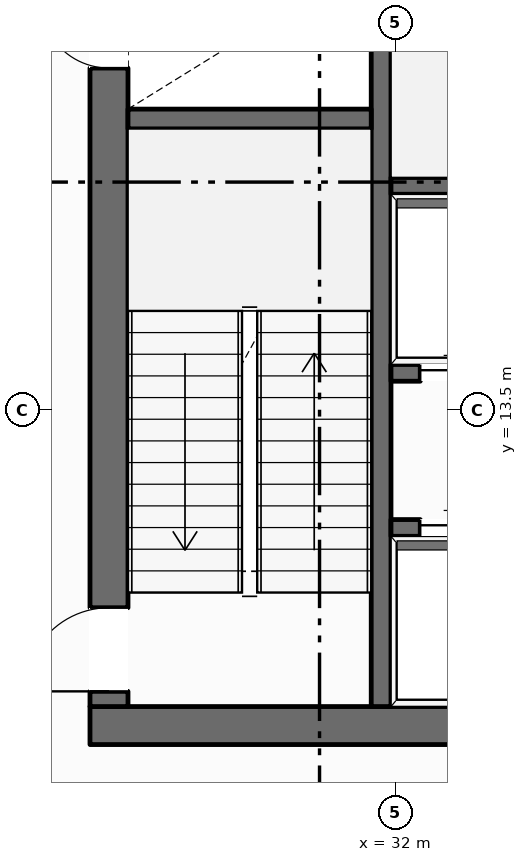
"""IFC4 building model, lengths in metres.
Left out: names, types, materials, properties, quantities, classifications, styles, units other than length and angle.
Written with IfcOpenShell. Run it as: python <this file> out.ifc"""

import sys

from ifc_helpers import new_model, si_unit, direction, frame, frame_2d, origin, place, context, subcontext, project, spatial, rectangle, extrude, element, fill, save


model = new_model("IFC4")
c1 = context("Model", 3, precision=1e-05, world=origin(), true_north=direction((0.0, 1.0)))
c2 = subcontext(c1, "Body", "Model", "MODEL_VIEW")
j1 = project(units=[si_unit("LENGTHUNIT", "METRE"), si_unit("PLANEANGLEUNIT", "RADIAN")], contexts=[c1])
p1 = place(None, origin())
s1 = spatial("IfcSite", under=j1, at=p1, CompositionType="ELEMENT")
p2 = place(p1, origin())
s2 = spatial("IfcBuilding", under=s1, at=p2, CompositionType="ELEMENT")
p3 = place(p2, frame((0.0, 0.0, 80.5)))
s3 = spatial("IfcBuildingStorey", under=s2, at=p3, CompositionType="ELEMENT", Elevation=80.5)
p4 = place(p3, frame((27.98, 9.35, 0.0), z_axis=(0.0, 0.0, 1.0), x_axis=(1.0, 0.0, 0.0)))
e1 = element("IfcWall", 1, at=p4, inside=s3, PredefinedType="SOLIDWALL", context=c2, shape_type="SweptSolid", body=[
    extrude(rectangle(XDim=20.04, YDim=0.5, at=frame_2d((10.02, 0.0))), origin(), (0.0, 0.0, 1.0), 4.75),
])
p5 = place(p4, frame((10.52, 0.0, 0.0)))
e2 = element("IfcOpeningElement", 2, at=p5, cuts=e1, PredefinedType="OPENING", context=c2, shape_type="SweptSolid", body=[
    extrude(rectangle(XDim=1.4, YDim=2.2, at=frame_2d((0.7, 1.1))), frame((0.0, 0.26, 0.0), z_axis=(0.0, -1.0, 0.0), x_axis=(1.0, 0.0, 0.0)), (0.0, 0.0, 1.0), 0.52),
])
p6 = place(p3, frame((28.23, 9.6, 0.0), z_axis=(0.0, 0.0, 1.0), x_axis=(0.0, 1.0, 0.0)))
e3 = element("IfcWall", 3, at=p6, inside=s3, PredefinedType="SOLIDWALL", context=c2, shape_type="SweptSolid", body=[
    extrude(rectangle(XDim=13.0, YDim=0.5, at=frame_2d((6.5, 0.0))), origin(), (0.0, 0.0, 1.0), 4.75),
])
p7 = place(p6, frame((0.2, 0.0, 0.0)))
e4 = element("IfcOpeningElement", 4, at=p7, cuts=e3, PredefinedType="OPENING", context=c2, shape_type="SweptSolid", body=[
    extrude(rectangle(XDim=1.1, YDim=2.15, at=frame_2d((0.55, 1.075))), frame((0.0, 0.26, 0.0), z_axis=(0.0, -1.0, 0.0), x_axis=(1.0, 0.0, 0.0)), (0.0, 0.0, 1.0), 0.52),
])
p8 = place(p6, frame((8.4, 0.0, 0.0)))
e5 = element("IfcOpeningElement", 5, at=p8, cuts=e3, PredefinedType="OPENING", context=c2, shape_type="SweptSolid", body=[
    extrude(rectangle(XDim=0.9, YDim=2.1, at=frame_2d((0.45, 1.05))), frame((0.0, 0.26, 0.0), z_axis=(0.0, -1.0, 0.0), x_axis=(1.0, 0.0, 0.0)), (0.0, 0.0, 1.0), 0.52),
])
p9 = place(p3, frame((31.81, 9.6, 0.0), z_axis=(0.0, 0.0, 1.0), x_axis=(0.0, 1.0, 0.0)))
e6 = element("IfcWall", 6, at=p9, inside=s3, PredefinedType="SHEAR", context=c2, shape_type="SweptSolid", body=[
    extrude(rectangle(XDim=13.0, YDim=0.26, at=frame_2d((6.5, 0.0))), origin(), (0.0, 0.0, 1.0), 4.75),
])
p10 = place(p9, frame((10.925, 0.0, 0.0)))
e7 = element("IfcOpeningElement", 7, at=p10, cuts=e6, PredefinedType="OPENING", context=c2, shape_type="SweptSolid", body=[
    extrude(rectangle(XDim=1.25, YDim=2.25, at=frame_2d((0.625, 1.125))), frame((0.0, 0.14, 0.0), z_axis=(0.0, -1.0, 0.0), x_axis=(1.0, 0.0, 0.0)), (0.0, 0.0, 1.0), 0.28),
])
p11 = place(p3, frame((28.48, 17.33, 0.0), z_axis=(0.0, 0.0, 1.0), x_axis=(1.0, 0.0, 0.0)))
e8 = element("IfcWall", 8, at=p11, inside=s3, PredefinedType="SHEAR", context=c2, shape_type="SweptSolid", body=[
    extrude(rectangle(XDim=3.2, YDim=0.26, at=frame_2d((1.6, 0.0))), origin(), (0.0, 0.0, 1.0), 4.75),
])
p12 = place(p3, frame((31.94, 16.45, 0.0), z_axis=(0.0, 0.0, 1.0), x_axis=(1.0, 0.0, 0.0)))
e9 = element("IfcWall", 9, at=p12, inside=s3, PredefinedType="SOLIDWALL", context=c2, shape_type="SweptSolid", body=[
    extrude(rectangle(XDim=12.12, YDim=0.22, at=frame_2d((6.06, 0.0))), origin(), (0.0, 0.0, 1.0), 4.75),
])
p13 = place(p3, frame((31.94, 13.99, 0.0), z_axis=(0.0, 0.0, 1.0), x_axis=(1.0, 0.0, 0.0)))
e10 = element("IfcWall", 10, at=p13, inside=s3, PredefinedType="SOLIDWALL", context=c2, shape_type="SweptSolid", body=[
    extrude(rectangle(XDim=12.12, YDim=0.22, at=frame_2d((6.06, 0.0))), origin(), (0.0, 0.0, 1.0), 4.75),
])
p14 = place(p13, frame((0.385, 0.0, 0.0)))
e11 = element("IfcOpeningElement", 11, at=p14, cuts=e10, PredefinedType="OPENING", context=c2, shape_type="SweptSolid", body=[
    extrude(rectangle(XDim=1.1, YDim=2.2, at=frame_2d((0.55, 1.1))), frame((0.0, 0.12, 0.0), z_axis=(0.0, -1.0, 0.0), x_axis=(1.0, 0.0, 0.0)), (0.0, 0.0, 1.0), 0.24),
])
p15 = place(p13, frame((2.435, 0.0, 0.0)))
e12 = element("IfcOpeningElement", 12, at=p15, cuts=e10, PredefinedType="OPENING", context=c2, shape_type="SweptSolid", body=[
    extrude(rectangle(XDim=1.1, YDim=2.2, at=frame_2d((0.55, 1.1))), frame((0.0, 0.12, 0.0), z_axis=(0.0, -1.0, 0.0), x_axis=(1.0, 0.0, 0.0)), (0.0, 0.0, 1.0), 0.24),
])
p16 = place(p13, frame((4.485, 0.0, 0.0)))
e13 = element("IfcOpeningElement", 13, at=p16, cuts=e10, PredefinedType="OPENING", context=c2, shape_type="SweptSolid", body=[
    extrude(rectangle(XDim=1.1, YDim=2.2, at=frame_2d((0.55, 1.1))), frame((0.0, 0.12, 0.0), z_axis=(0.0, -1.0, 0.0), x_axis=(1.0, 0.0, 0.0)), (0.0, 0.0, 1.0), 0.24),
])
p17 = place(p13, frame((6.535, 0.0, 0.0)))
e14 = element("IfcOpeningElement", 14, at=p17, cuts=e10, PredefinedType="OPENING", context=c2, shape_type="SweptSolid", body=[
    extrude(rectangle(XDim=1.1, YDim=2.2, at=frame_2d((0.55, 1.1))), frame((0.0, 0.12, 0.0), z_axis=(0.0, -1.0, 0.0), x_axis=(1.0, 0.0, 0.0)), (0.0, 0.0, 1.0), 0.24),
])
p18 = place(p13, frame((8.585, 0.0, 0.0)))
e15 = element("IfcOpeningElement", 15, at=p18, cuts=e10, PredefinedType="OPENING", context=c2, shape_type="SweptSolid", body=[
    extrude(rectangle(XDim=1.1, YDim=2.2, at=frame_2d((0.55, 1.1))), frame((0.0, 0.12, 0.0), z_axis=(0.0, -1.0, 0.0), x_axis=(1.0, 0.0, 0.0)), (0.0, 0.0, 1.0), 0.24),
])
p19 = place(p13, frame((10.635, 0.0, 0.0)))
e16 = element("IfcOpeningElement", 16, at=p19, cuts=e10, PredefinedType="OPENING", context=c2, shape_type="SweptSolid", body=[
    extrude(rectangle(XDim=1.1, YDim=2.2, at=frame_2d((0.55, 1.1))), frame((0.0, 0.12, 0.0), z_axis=(0.0, -1.0, 0.0), x_axis=(1.0, 0.0, 0.0)), (0.0, 0.0, 1.0), 0.24),
])
p20 = place(p3, frame((31.94, 11.95, 0.0), z_axis=(0.0, 0.0, 1.0), x_axis=(1.0, 0.0, 0.0)))
e17 = element("IfcWall", 17, at=p20, inside=s3, PredefinedType="SOLIDWALL", context=c2, shape_type="SweptSolid", body=[
    extrude(rectangle(XDim=6.19, YDim=0.22, at=frame_2d((3.095, 0.0))), origin(), (0.0, 0.0, 1.0), 4.75),
])
p21 = place(p20, frame((0.385, 0.0, 0.0)))
e18 = element("IfcOpeningElement", 18, at=p21, cuts=e17, PredefinedType="OPENING", context=c2, shape_type="SweptSolid", body=[
    extrude(rectangle(XDim=1.1, YDim=2.2, at=frame_2d((0.55, 1.1))), frame((0.0, 0.12, 0.0), z_axis=(0.0, -1.0, 0.0), x_axis=(1.0, 0.0, 0.0)), (0.0, 0.0, 1.0), 0.24),
])
p22 = place(p20, frame((2.435, 0.0, 0.0)))
e19 = element("IfcOpeningElement", 19, at=p22, cuts=e17, PredefinedType="OPENING", context=c2, shape_type="SweptSolid", body=[
    extrude(rectangle(XDim=1.1, YDim=2.2, at=frame_2d((0.55, 1.1))), frame((0.0, 0.12, 0.0), z_axis=(0.0, -1.0, 0.0), x_axis=(1.0, 0.0, 0.0)), (0.0, 0.0, 1.0), 0.24),
])
p23 = place(p20, frame((4.485, 0.0, 0.0)))
e20 = element("IfcOpeningElement", 20, at=p23, cuts=e17, PredefinedType="OPENING", context=c2, shape_type="SweptSolid", body=[
    extrude(rectangle(XDim=1.1, YDim=2.2, at=frame_2d((0.55, 1.1))), frame((0.0, 0.12, 0.0), z_axis=(0.0, -1.0, 0.0), x_axis=(1.0, 0.0, 0.0)), (0.0, 0.0, 1.0), 0.24),
])
p24 = place(p3, frame((13.724, 13.51, 0.0), z_axis=(0.0, 0.0, 1.0), x_axis=(0.500779221595, 0.865575052331, 0.0)))
e21 = element("IfcWall", 21, at=p24, inside=s3, PredefinedType="STANDARD", context=c2, shape_type="SweptSolid", body=[
    extrude(rectangle(XDim=35.421, YDim=0.38, at=frame_2d((17.71, 0.0))), origin(), (0.0, 0.0, 1.0), 4.209),
])
p25 = place(p24, frame((31.073, 0.0, 0.65)))
e22 = element("IfcOpeningElement", 22, at=p25, cuts=e21, PredefinedType="OPENING", context=c2, shape_type="SweptSolid", body=[
    extrude(rectangle(XDim=2.0, YDim=2.25, at=frame_2d((1.0, 1.125))), frame((0.0, 0.2, 0.0), z_axis=(0.0, -1.0, 0.0), x_axis=(1.0, 0.0, 0.0)), (0.0, 0.0, 1.0), 0.4),
])
p26 = place(p24, frame((2.348, 0.0, 0.65)))
e23 = element("IfcOpeningElement", 23, at=p26, cuts=e21, PredefinedType="OPENING", context=c2, shape_type="SweptSolid", body=[
    extrude(rectangle(XDim=2.0, YDim=2.25, at=frame_2d((1.0, 1.125))), frame((0.0, 0.2, 0.0), z_axis=(0.0, -1.0, 0.0), x_axis=(1.0, 0.0, 0.0)), (0.0, 0.0, 1.0), 0.4),
])
p27 = place(p7, origin())
e24 = element("IfcDoor", 24, at=p27, inside=s3, OperationType="SINGLE_SWING_LEFT", PredefinedType="DOOR", context=c2, shape_type="SweptSolid", body=[
    extrude(rectangle(XDim=1.1, YDim=2.15, at=frame_2d((0.55, 1.075))), frame((0.0, 0.025, 0.0), z_axis=(0.0, -1.0, 0.0), x_axis=(1.0, 0.0, 0.0)), (0.0, 0.0, 1.0), 0.05),
])
fill(e4, e24)
p28 = place(p8, origin())
e25 = element("IfcDoor", 25, at=p28, inside=s3, OperationType="SINGLE_SWING_RIGHT", PredefinedType="DOOR", context=c2, shape_type="SweptSolid", body=[
    extrude(rectangle(XDim=0.9, YDim=2.1, at=frame_2d((0.45, 1.05))), frame((0.0, 0.025, 0.0), z_axis=(0.0, -1.0, 0.0), x_axis=(1.0, 0.0, 0.0)), (0.0, 0.0, 1.0), 0.05),
])
fill(e5, e25)
p29 = place(p21, origin())
e26 = element("IfcDoor", 26, at=p29, inside=s3, OperationType="DOUBLE_DOOR_SLIDING", PredefinedType="DOOR", context=c2, shape_type="SweptSolid", body=[
    extrude(rectangle(XDim=1.1, YDim=2.2, at=frame_2d((0.55, 1.1))), frame((0.0, 0.025, 0.0), z_axis=(0.0, -1.0, 0.0), x_axis=(1.0, 0.0, 0.0)), (0.0, 0.0, 1.0), 0.05),
])
fill(e18, e26)
p30 = place(p14, origin())
e27 = element("IfcDoor", 27, at=p30, inside=s3, OperationType="DOUBLE_DOOR_SLIDING", PredefinedType="DOOR", context=c2, shape_type="SweptSolid", body=[
    extrude(rectangle(XDim=1.1, YDim=2.2, at=frame_2d((0.55, 1.1))), frame((0.0, 0.025, 0.0), z_axis=(0.0, -1.0, 0.0), x_axis=(1.0, 0.0, 0.0)), (0.0, 0.0, 1.0), 0.05),
])
fill(e11, e27)
save(model, sys.argv[1])
